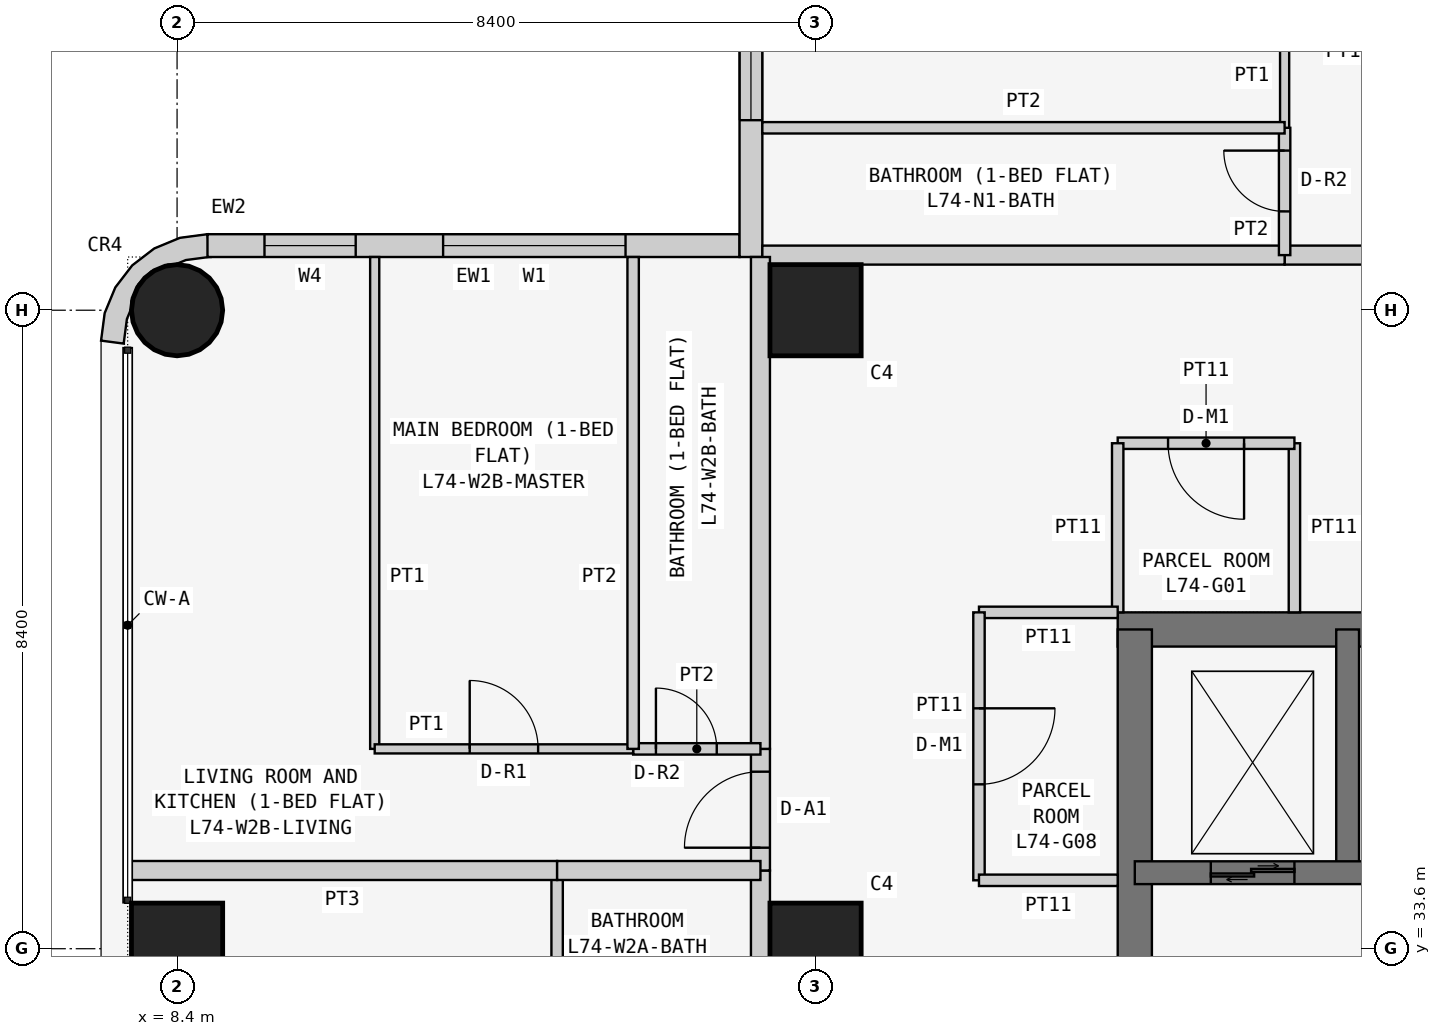
"""IFC4 building model, lengths in metres.
Left out: names, types, materials, properties, quantities, classifications, styles, units other than length and angle.
Written with IfcOpenShell. Run it as: python <this file> out.ifc"""

import sys

from ifc_helpers import new_model, si_unit, direction, frame, frame_2d, origin, origin_2d, place, context, subcontext, project, spatial, polyline, rectangle, circle, outline, extrude, element, fill, save


model = new_model("IFC4")
c1 = context("Model", 3, precision=1e-05, world=origin(), true_north=direction((0.0, 1.0)))
c2 = subcontext(c1, "Body", "Model", "MODEL_VIEW")
j1 = project(units=[si_unit("LENGTHUNIT", "METRE"), si_unit("PLANEANGLEUNIT", "RADIAN")], contexts=[c1])
p1 = place(None, origin())
s1 = spatial("IfcSite", under=j1, at=p1, CompositionType="ELEMENT")
p2 = place(p1, origin())
s2 = spatial("IfcBuilding", under=s1, at=p2, CompositionType="ELEMENT")
p3 = place(p2, frame((0.0, 0.0, 282.9)))
s3 = spatial("IfcBuildingStorey", under=s2, at=p3, CompositionType="ELEMENT", Elevation=282.9)
p4 = place(p3, frame((8.4, 33.6, 0.0), z_axis=(0.0, 0.0, 1.0), x_axis=(1.0, 0.0, 0.0)))
e1 = element("IfcColumn", 1, at=p4, inside=s3, PredefinedType="COLUMN", context=c2, shape_type="SweptSolid", body=[
    extrude(rectangle(XDim=1.2, YDim=1.2, at=origin_2d()), origin(), (0.0, 0.0, 1.0), 3.6),
])
p5 = place(p3, frame((8.4, 42.0, 0.0), z_axis=(0.0, 0.0, 1.0), x_axis=(1.0, 0.0, 0.0)))
e2 = element("IfcColumn", 2, at=p5, inside=s3, PredefinedType="COLUMN", context=c2, shape_type="SweptSolid", body=[
    extrude(circle(Radius=0.6, at=origin_2d()), origin(), (0.0, 0.0, 1.0), 3.6),
])
for number, where, z_axis, x_axis in (
    (3, (16.8, 33.6, 0.0), (0.0, 0.0, 1.0), (1.0, 0.0, 0.0)),
    (4, (16.8, 42.0, 0.0), (0.0, 0.0, 1.0), (1.0, 0.0, 0.0)),
):
    element("IfcColumn", number, at=place(p3, frame(where, z_axis=z_axis, x_axis=x_axis)), inside=s3, PredefinedType="COLUMN", context=c2, shape_type="SweptSolid", body=[
        extrude(rectangle(XDim=1.2, YDim=1.2, at=origin_2d()), origin(), (0.0, 0.0, 1.0), 3.6),
    ])
p6 = place(p3, frame((37.8, 37.8, 0.0), z_axis=(0.0, 0.0, 1.0), x_axis=(-1.0, 0.0, 0.0)))
e5 = element("IfcWall", 5, at=p6, inside=s3, PredefinedType="SHEAR", context=c2, shape_type="SweptSolid", body=[
    extrude(rectangle(XDim=17.025, YDim=0.45, at=frame_2d((8.513, 0.0))), origin(), (0.0, 0.0, 1.0), 3.6),
])
p7 = place(p3, frame((21.0, 37.8, 0.0), z_axis=(0.0, 0.0, 1.0), x_axis=(0.0, -1.0, 0.0)))
e6 = element("IfcWall", 6, at=p7, inside=s3, PredefinedType="SHEAR", context=c2, shape_type="SweptSolid", body=[
    extrude(rectangle(XDim=17.025, YDim=0.45, at=frame_2d((8.513, 0.0))), origin(), (0.0, 0.0, 1.0), 3.6),
])
p8 = place(p7, frame((5.4, 0.0, 0.0)))
e7 = element("IfcOpeningElement", 7, at=p8, cuts=e6, PredefinedType="OPENING", context=c2, shape_type="SweptSolid", body=[
    extrude(rectangle(XDim=1.2, YDim=2.1, at=frame_2d((0.6, 1.05))), frame((0.0, 0.235, 0.0), z_axis=(0.0, -1.0, 0.0), x_axis=(1.0, 0.0, 0.0)), (0.0, 0.0, 1.0), 0.47),
])
p9 = place(p3, frame((21.0, 34.6, 0.0), z_axis=(0.0, 0.0, 1.0), x_axis=(1.0, 0.0, 0.0)))
e8 = element("IfcWall", 8, at=p9, inside=s3, PredefinedType="SHEAR", context=c2, shape_type="SweptSolid", body=[
    extrude(rectangle(XDim=11.2, YDim=0.3, at=frame_2d((5.6, 0.0))), origin(), (0.0, 0.0, 1.0), 3.6),
])
p10 = place(p9, frame((9.35, 0.0, 0.0)))
e9 = element("IfcOpeningElement", 9, at=p10, cuts=e8, PredefinedType="OPENING", context=c2, shape_type="SweptSolid", body=[
    extrude(rectangle(XDim=0.9, YDim=2.1, at=frame_2d((0.45, 1.05))), frame((0.0, 0.16, 0.0), z_axis=(0.0, -1.0, 0.0), x_axis=(1.0, 0.0, 0.0)), (0.0, 0.0, 1.0), 0.32),
])
p11 = place(p9, frame((1.0, 0.0, 0.0)))
e10 = element("IfcOpeningElement", 10, at=p11, cuts=e8, PredefinedType="OPENING", context=c2, shape_type="SweptSolid", body=[
    extrude(rectangle(XDim=1.1, YDim=2.1, at=frame_2d((0.55, 1.05))), frame((0.0, 0.16, 0.0), z_axis=(0.0, -1.0, 0.0), x_axis=(1.0, 0.0, 0.0)), (0.0, 0.0, 1.0), 0.32),
])
p12 = place(p9, frame((3.65, 0.0, 0.0)))
e11 = element("IfcOpeningElement", 11, at=p12, cuts=e8, PredefinedType="OPENING", context=c2, shape_type="SweptSolid", body=[
    extrude(rectangle(XDim=1.1, YDim=2.1, at=frame_2d((0.55, 1.05))), frame((0.0, 0.16, 0.0), z_axis=(0.0, -1.0, 0.0), x_axis=(1.0, 0.0, 0.0)), (0.0, 0.0, 1.0), 0.32),
])
p13 = place(p9, frame((6.35, 0.0, 0.0)))
e12 = element("IfcOpeningElement", 12, at=p13, cuts=e8, PredefinedType="OPENING", context=c2, shape_type="SweptSolid", body=[
    extrude(rectangle(XDim=1.3, YDim=2.1, at=frame_2d((0.65, 1.05))), frame((0.0, 0.16, 0.0), z_axis=(0.0, -1.0, 0.0), x_axis=(1.0, 0.0, 0.0)), (0.0, 0.0, 1.0), 0.32),
])
p14 = place(p3, frame((23.8, 34.6, 0.0), z_axis=(0.0, 0.0, 1.0), x_axis=(0.0, 1.0, 0.0)))
e13 = element("IfcWall", 13, at=p14, inside=s3, PredefinedType="SHEAR", context=c2, shape_type="SweptSolid", body=[
    extrude(rectangle(XDim=3.2, YDim=0.3, at=frame_2d((1.6, 0.0))), origin(), (0.0, 0.0, 1.0), 3.6),
])
p15 = place(p3, frame((15.8, 42.85, 0.0), z_axis=(0.0, 0.0, 1.0), x_axis=(-1.0, 0.0, 0.0)))
e14 = element("IfcWall", 14, at=p15, inside=s3, PredefinedType="SOLIDWALL", context=c2, shape_type="SweptSolid", body=[
    extrude(rectangle(XDim=7.0, YDim=0.3, at=frame_2d((3.5, 0.0))), origin(), (0.0, 0.0, 1.0), 3.45),
])
p16 = place(p15, frame((1.5, 0.0, 0.9)))
e15 = element("IfcOpeningElement", 15, at=p16, cuts=e14, PredefinedType="OPENING", context=c2, shape_type="SweptSolid", body=[
    extrude(rectangle(XDim=2.4, YDim=1.5, at=frame_2d((1.2, 0.75))), frame((0.0, 0.16, 0.0), z_axis=(0.0, -1.0, 0.0), x_axis=(1.0, 0.0, 0.0)), (0.0, 0.0, 1.0), 0.32),
])
p17 = place(p15, frame((5.05, 0.0, 0.9)))
e16 = element("IfcOpeningElement", 16, at=p17, cuts=e14, PredefinedType="OPENING", context=c2, shape_type="SweptSolid", body=[
    extrude(rectangle(XDim=1.2, YDim=1.5, at=frame_2d((0.6, 0.75))), frame((0.0, 0.16, 0.0), z_axis=(0.0, -1.0, 0.0), x_axis=(1.0, 0.0, 0.0)), (0.0, 0.0, 1.0), 0.32),
])
p18 = place(p3, frame((15.95, 50.0, 0.0), z_axis=(0.0, 0.0, 1.0), x_axis=(0.0, -1.0, 0.0)))
e17 = element("IfcWall", 17, at=p18, inside=s3, PredefinedType="SOLIDWALL", context=c2, shape_type="SweptSolid", body=[
    extrude(rectangle(XDim=7.3, YDim=0.3, at=frame_2d((3.65, 0.0))), origin(), (0.0, 0.0, 1.0), 3.45),
])
p19 = place(p18, frame((3.1, 0.0, 0.9)))
e18 = element("IfcOpeningElement", 18, at=p19, cuts=e17, PredefinedType="OPENING", context=c2, shape_type="SweptSolid", body=[
    extrude(rectangle(XDim=2.4, YDim=1.5, at=frame_2d((1.2, 0.75))), frame((0.0, 0.16, 0.0), z_axis=(0.0, -1.0, 0.0), x_axis=(1.0, 0.0, 0.0)), (0.0, 0.0, 1.0), 0.32),
])
p20 = place(p18, frame((0.75, 0.0, 0.9)))
e19 = element("IfcOpeningElement", 19, at=p20, cuts=e17, PredefinedType="OPENING", context=c2, shape_type="SweptSolid", body=[
    extrude(rectangle(XDim=1.2, YDim=1.5, at=frame_2d((0.6, 0.75))), frame((0.0, 0.16, 0.0), z_axis=(0.0, -1.0, 0.0), x_axis=(1.0, 0.0, 0.0)), (0.0, 0.0, 1.0), 0.32),
])
p21 = place(p3, frame((8.762, 42.576, 0.0), z_axis=(0.0, 0.0, 1.0), x_axis=(-0.707106781187, 0.707106781187, 0.0)))
e20 = element("IfcWall", 20, at=p21, inside=s3, PredefinedType="SOLIDWALL", context=c2, shape_type="SweptSolid", body=[
    extrude(outline(polyline([(0.233, 0.114), (0.047, -0.129), (0.033, -0.143), (0.273, -0.327), (0.495, -0.037), (0.635, 0.3), (0.683, 0.663), (0.635, 1.025), (0.495, 1.363), (0.273, 1.653), (0.033, 1.469), (0.047, 1.455), (0.233, 1.212), (0.292, 1.069), (0.358, 1.003), (0.449, 0.783), (0.449, 0.543), (0.358, 0.322), (0.292, 0.257), (0.233, 0.114)])), origin(), (0.0, 0.0, 1.0), 3.45),
])
p22 = place(p3, frame((23.1, 38.025, 0.0), z_axis=(0.0, 0.0, 1.0), x_axis=(0.0, 1.0, 0.0)))
e21 = element("IfcWall", 21, at=p22, inside=s3, PredefinedType="PARTITIONING", context=c2, shape_type="SweptSolid", body=[
    extrude(rectangle(XDim=2.225, YDim=0.15, at=frame_2d((1.113, 0.0))), origin(), (0.0, 0.0, 1.0), 3.45),
])
p23 = place(p3, frame((23.1, 40.25, 0.0), z_axis=(0.0, 0.0, 1.0), x_axis=(-1.0, 0.0, 0.0)))
e22 = element("IfcWall", 22, at=p23, inside=s3, PredefinedType="PARTITIONING", context=c2, shape_type="SweptSolid", body=[
    extrude(rectangle(XDim=2.325, YDim=0.15, at=frame_2d((1.163, 0.0))), origin(), (0.0, 0.0, 1.0), 3.45),
])
p24 = place(p23, frame((0.663, 0.0, 0.0)))
e23 = element("IfcOpeningElement", 23, at=p24, cuts=e22, PredefinedType="OPENING", context=c2, shape_type="SweptSolid", body=[
    extrude(rectangle(XDim=1.0, YDim=2.1, at=frame_2d((0.5, 1.05))), frame((0.0, 0.085, 0.0), z_axis=(0.0, -1.0, 0.0), x_axis=(1.0, 0.0, 0.0)), (0.0, 0.0, 1.0), 0.17),
])
p25 = place(p3, frame((20.775, 40.25, 0.0), z_axis=(0.0, 0.0, 1.0), x_axis=(0.0, -1.0, 0.0)))
e24 = element("IfcWall", 24, at=p25, inside=s3, PredefinedType="PARTITIONING", context=c2, shape_type="SweptSolid", body=[
    extrude(rectangle(XDim=2.225, YDim=0.15, at=frame_2d((1.113, 0.0))), origin(), (0.0, 0.0, 1.0), 3.45),
])
p26 = place(p3, frame((20.775, 38.025, 0.0), z_axis=(0.0, 0.0, 1.0), x_axis=(-1.0, 0.0, 0.0)))
e25 = element("IfcWall", 25, at=p26, inside=s3, PredefinedType="PARTITIONING", context=c2, shape_type="SweptSolid", body=[
    extrude(rectangle(XDim=1.825, YDim=0.15, at=frame_2d((0.913, 0.0))), origin(), (0.0, 0.0, 1.0), 3.45),
])
p27 = place(p3, frame((18.95, 38.025, 0.0), z_axis=(0.0, 0.0, 1.0), x_axis=(0.0, -1.0, 0.0)))
e26 = element("IfcWall", 26, at=p27, inside=s3, PredefinedType="PARTITIONING", context=c2, shape_type="SweptSolid", body=[
    extrude(rectangle(XDim=3.525, YDim=0.15, at=frame_2d((1.762, 0.0))), origin(), (0.0, 0.0, 1.0), 3.45),
])
p28 = place(p27, frame((1.262, 0.0, 0.0)))
e27 = element("IfcOpeningElement", 27, at=p28, cuts=e26, PredefinedType="OPENING", context=c2, shape_type="SweptSolid", body=[
    extrude(rectangle(XDim=1.0, YDim=2.1, at=frame_2d((0.5, 1.05))), frame((0.0, 0.085, 0.0), z_axis=(0.0, -1.0, 0.0), x_axis=(1.0, 0.0, 0.0)), (0.0, 0.0, 1.0), 0.17),
])
p29 = place(p3, frame((18.95, 34.5, 0.0), z_axis=(0.0, 0.0, 1.0), x_axis=(1.0, 0.0, 0.0)))
e28 = element("IfcWall", 28, at=p29, inside=s3, PredefinedType="PARTITIONING", context=c2, shape_type="SweptSolid", body=[
    extrude(rectangle(XDim=1.825, YDim=0.15, at=frame_2d((0.913, 0.0))), origin(), (0.0, 0.0, 1.0), 3.45),
])
p30 = place(p3, frame((22.971, 42.725, 0.0), z_axis=(0.0, 0.0, 1.0), x_axis=(1.0, 0.0, 0.0)))
e29 = element("IfcWall", 29, at=p30, inside=s3, PredefinedType="PARTITIONING", context=c2, shape_type="SweptSolid", body=[
    extrude(rectangle(XDim=6.429, YDim=0.25, at=frame_2d((3.214, 0.0))), origin(), (0.0, 0.0, 1.0), 3.45),
])
p31 = place(p30, frame((4.929, 0.0, 0.0)))
e30 = element("IfcOpeningElement", 30, at=p31, cuts=e29, PredefinedType="OPENING", context=c2, shape_type="SweptSolid", body=[
    extrude(rectangle(XDim=1.0, YDim=2.1, at=frame_2d((0.5, 1.05))), frame((0.0, 0.135, 0.0), z_axis=(0.0, -1.0, 0.0), x_axis=(1.0, 0.0, 0.0)), (0.0, 0.0, 1.0), 0.27),
])
p32 = place(p3, frame((16.1, 42.725, 0.0), z_axis=(0.0, 0.0, 1.0), x_axis=(1.0, 0.0, 0.0)))
e31 = element("IfcWall", 31, at=p32, inside=s3, PredefinedType="PARTITIONING", context=c2, shape_type="SweptSolid", body=[
    extrude(rectangle(XDim=6.871, YDim=0.25, at=frame_2d((3.436, 0.0))), origin(), (0.0, 0.0, 1.0), 3.45),
])
p33 = place(p3, frame((16.075, 32.0, 0.0), z_axis=(0.0, 0.0, 1.0), x_axis=(0.0, 1.0, 0.0)))
e32 = element("IfcWall", 32, at=p33, inside=s3, PredefinedType="PARTITIONING", context=c2, shape_type="SweptSolid", body=[
    extrude(rectangle(XDim=2.629, YDim=0.25, at=frame_2d((1.314, 0.0))), origin(), (0.0, 0.0, 1.0), 3.45),
])
p34 = place(p3, frame((16.075, 34.629, 0.0), z_axis=(0.0, 0.0, 1.0), x_axis=(0.0, 1.0, 0.0)))
e33 = element("IfcWall", 33, at=p34, inside=s3, PredefinedType="PARTITIONING", context=c2, shape_type="SweptSolid", body=[
    extrude(rectangle(XDim=1.6, YDim=0.25, at=frame_2d((0.8, 0.0))), origin(), (0.0, 0.0, 1.0), 3.45),
])
p35 = place(p34, frame((0.3, 0.0, 0.0)))
e34 = element("IfcOpeningElement", 34, at=p35, cuts=e33, PredefinedType="OPENING", context=c2, shape_type="SweptSolid", body=[
    extrude(rectangle(XDim=1.0, YDim=2.1, at=frame_2d((0.5, 1.05))), frame((0.0, 0.135, 0.0), z_axis=(0.0, -1.0, 0.0), x_axis=(1.0, 0.0, 0.0)), (0.0, 0.0, 1.0), 0.27),
])
p36 = place(p3, frame((16.075, 36.229, 0.0), z_axis=(0.0, 0.0, 1.0), x_axis=(0.0, 1.0, 0.0)))
e35 = element("IfcWall", 35, at=p36, inside=s3, PredefinedType="PARTITIONING", context=c2, shape_type="SweptSolid", body=[
    extrude(rectangle(XDim=6.471, YDim=0.25, at=frame_2d((3.235, 0.0))), origin(), (0.0, 0.0, 1.0), 3.45),
])
p37 = place(p3, frame((22.971, 42.725, 0.0), z_axis=(0.0, 0.0, 1.0), x_axis=(0.0, 1.0, 0.0)))
e36 = element("IfcWall", 36, at=p37, inside=s3, PredefinedType="PARTITIONING", context=c2, shape_type="SweptSolid", body=[
    extrude(rectangle(XDim=1.675, YDim=0.15, at=frame_2d((0.837, 0.0))), origin(), (0.0, 0.0, 1.0), 3.45),
])
p38 = place(p37, frame((0.575, 0.0, 0.0)))
e37 = element("IfcOpeningElement", 37, at=p38, cuts=e36, PredefinedType="OPENING", context=c2, shape_type="SweptSolid", body=[
    extrude(rectangle(XDim=0.8, YDim=2.1, at=frame_2d((0.4, 1.05))), frame((0.0, 0.085, 0.0), z_axis=(0.0, -1.0, 0.0), x_axis=(1.0, 0.0, 0.0)), (0.0, 0.0, 1.0), 0.17),
])
p39 = place(p3, frame((22.971, 44.4, 0.0), z_axis=(0.0, 0.0, 1.0), x_axis=(0.0, 1.0, 0.0)))
e38 = element("IfcWall", 38, at=p39, inside=s3, PredefinedType="PARTITIONING", context=c2, shape_type="SweptSolid", body=[
    extrude(rectangle(XDim=3.4, YDim=0.12, at=frame_2d((1.7, 0.0))), origin(), (0.0, 0.0, 1.0), 3.45),
])
p40 = place(p39, frame((1.25, 0.0, 0.0)))
e39 = element("IfcOpeningElement", 39, at=p40, cuts=e38, PredefinedType="OPENING", context=c2, shape_type="SweptSolid", body=[
    extrude(rectangle(XDim=0.9, YDim=2.1, at=frame_2d((0.45, 1.05))), frame((0.0, 0.07, 0.0), z_axis=(0.0, -1.0, 0.0), x_axis=(1.0, 0.0, 0.0)), (0.0, 0.0, 1.0), 0.14),
])
p41 = place(p3, frame((22.971, 44.4, 0.0), z_axis=(0.0, 0.0, 1.0), x_axis=(-1.0, 0.0, 0.0)))
e40 = element("IfcWall", 40, at=p41, inside=s3, PredefinedType="PARTITIONING", context=c2, shape_type="SweptSolid", body=[
    extrude(rectangle(XDim=6.871, YDim=0.15, at=frame_2d((3.436, 0.0))), origin(), (0.0, 0.0, 1.0), 3.45),
])
p42 = place(p3, frame((13.4, 34.629, 0.0), z_axis=(0.0, 0.0, 1.0), x_axis=(0.0, -1.0, 0.0)))
e41 = element("IfcWall", 41, at=p42, inside=s3, PredefinedType="PARTITIONING", context=c2, shape_type="SweptSolid", body=[
    extrude(rectangle(XDim=2.629, YDim=0.15, at=frame_2d((1.314, 0.0))), origin(), (0.0, 0.0, 1.0), 3.45),
])
p43 = place(p3, frame((7.75, 34.629, 0.0), z_axis=(0.0, 0.0, 1.0), x_axis=(1.0, 0.0, 0.0)))
e42 = element("IfcWall", 42, at=p43, inside=s3, PredefinedType="PARTITIONING", context=c2, shape_type="SweptSolid", body=[
    extrude(rectangle(XDim=5.65, YDim=0.25, at=frame_2d((2.825, 0.0))), origin(), (0.0, 0.0, 1.0), 3.45),
])
p44 = place(p3, frame((13.4, 34.629, 0.0), z_axis=(0.0, 0.0, 1.0), x_axis=(1.0, 0.0, 0.0)))
e43 = element("IfcWall", 43, at=p44, inside=s3, PredefinedType="PARTITIONING", context=c2, shape_type="SweptSolid", body=[
    extrude(rectangle(XDim=2.675, YDim=0.25, at=frame_2d((1.337, 0.0))), origin(), (0.0, 0.0, 1.0), 3.45),
])
p45 = place(p3, frame((14.4, 36.229, 0.0), z_axis=(0.0, 0.0, 1.0), x_axis=(1.0, 0.0, 0.0)))
e44 = element("IfcWall", 44, at=p45, inside=s3, PredefinedType="PARTITIONING", context=c2, shape_type="SweptSolid", body=[
    extrude(rectangle(XDim=1.675, YDim=0.15, at=frame_2d((0.837, 0.0))), origin(), (0.0, 0.0, 1.0), 3.45),
])
p46 = place(p45, frame((0.3, 0.0, 0.0)))
e45 = element("IfcOpeningElement", 45, at=p46, cuts=e44, PredefinedType="OPENING", context=c2, shape_type="SweptSolid", body=[
    extrude(rectangle(XDim=0.8, YDim=2.1, at=frame_2d((0.4, 1.05))), frame((0.0, 0.085, 0.0), z_axis=(0.0, -1.0, 0.0), x_axis=(1.0, 0.0, 0.0)), (0.0, 0.0, 1.0), 0.17),
])
p47 = place(p3, frame((11.0, 42.7, 0.0), z_axis=(0.0, 0.0, 1.0), x_axis=(0.0, -1.0, 0.0)))
e46 = element("IfcWall", 46, at=p47, inside=s3, PredefinedType="PARTITIONING", context=c2, shape_type="SweptSolid", body=[
    extrude(rectangle(XDim=6.471, YDim=0.12, at=frame_2d((3.235, 0.0))), origin(), (0.0, 0.0, 1.0), 3.45),
])
p48 = place(p3, frame((11.0, 36.229, 0.0), z_axis=(0.0, 0.0, 1.0), x_axis=(1.0, 0.0, 0.0)))
e47 = element("IfcWall", 47, at=p48, inside=s3, PredefinedType="PARTITIONING", context=c2, shape_type="SweptSolid", body=[
    extrude(rectangle(XDim=3.4, YDim=0.12, at=frame_2d((1.7, 0.0))), origin(), (0.0, 0.0, 1.0), 3.45),
])
p49 = place(p48, frame((1.25, 0.0, 0.0)))
e48 = element("IfcOpeningElement", 48, at=p49, cuts=e47, PredefinedType="OPENING", context=c2, shape_type="SweptSolid", body=[
    extrude(rectangle(XDim=0.9, YDim=2.1, at=frame_2d((0.45, 1.05))), frame((0.0, 0.07, 0.0), z_axis=(0.0, -1.0, 0.0), x_axis=(1.0, 0.0, 0.0)), (0.0, 0.0, 1.0), 0.14),
])
p50 = place(p3, frame((14.4, 36.229, 0.0), z_axis=(0.0, 0.0, 1.0), x_axis=(0.0, 1.0, 0.0)))
e49 = element("IfcWall", 49, at=p50, inside=s3, PredefinedType="PARTITIONING", context=c2, shape_type="SweptSolid", body=[
    extrude(rectangle(XDim=6.471, YDim=0.15, at=frame_2d((3.235, 0.0))), origin(), (0.0, 0.0, 1.0), 3.45),
])
p51 = place(p19, origin())
e50 = element("IfcWindow", 50, at=p51, inside=s3, PartitioningType="SINGLE_PANEL", PredefinedType="WINDOW", context=c2, shape_type="SweptSolid", body=[
    extrude(rectangle(XDim=2.4, YDim=1.5, at=frame_2d((1.2, 0.75))), frame((0.0, 0.03, 0.0), z_axis=(0.0, -1.0, 0.0), x_axis=(1.0, 0.0, 0.0)), (0.0, 0.0, 1.0), 0.06),
])
fill(e18, e50)
p52 = place(p16, origin())
e51 = element("IfcWindow", 51, at=p52, inside=s3, PartitioningType="SINGLE_PANEL", PredefinedType="WINDOW", context=c2, shape_type="SweptSolid", body=[
    extrude(rectangle(XDim=2.4, YDim=1.5, at=frame_2d((1.2, 0.75))), frame((0.0, 0.03, 0.0), z_axis=(0.0, -1.0, 0.0), x_axis=(1.0, 0.0, 0.0)), (0.0, 0.0, 1.0), 0.06),
])
fill(e15, e51)
p53 = place(p17, origin())
e52 = element("IfcWindow", 52, at=p53, inside=s3, PartitioningType="SINGLE_PANEL", PredefinedType="WINDOW", context=c2, shape_type="SweptSolid", body=[
    extrude(rectangle(XDim=1.2, YDim=1.5, at=frame_2d((0.6, 0.75))), frame((0.0, 0.03, 0.0), z_axis=(0.0, -1.0, 0.0), x_axis=(1.0, 0.0, 0.0)), (0.0, 0.0, 1.0), 0.06),
])
fill(e16, e52)
p54 = place(p24, origin())
e53 = element("IfcDoor", 53, at=p54, inside=s3, OperationType="SINGLE_SWING_LEFT", PredefinedType="DOOR", context=c2, shape_type="SweptSolid", body=[
    extrude(rectangle(XDim=1.0, YDim=2.1, at=frame_2d((0.5, 1.05))), frame((0.0, 0.025, 0.0), z_axis=(0.0, -1.0, 0.0), x_axis=(1.0, 0.0, 0.0)), (0.0, 0.0, 1.0), 0.05),
])
fill(e23, e53)
p55 = place(p28, origin())
e54 = element("IfcDoor", 54, at=p55, inside=s3, OperationType="SINGLE_SWING_LEFT", PredefinedType="DOOR", context=c2, shape_type="SweptSolid", body=[
    extrude(rectangle(XDim=1.0, YDim=2.1, at=frame_2d((0.5, 1.05))), frame((0.0, 0.025, 0.0), z_axis=(0.0, -1.0, 0.0), x_axis=(1.0, 0.0, 0.0)), (0.0, 0.0, 1.0), 0.05),
])
fill(e27, e54)
p56 = place(p38, origin())
e55 = element("IfcDoor", 55, at=p56, inside=s3, OperationType="SINGLE_SWING_RIGHT", PredefinedType="DOOR", context=c2, shape_type="SweptSolid", body=[
    extrude(rectangle(XDim=0.8, YDim=2.1, at=frame_2d((0.4, 1.05))), frame((0.0, 0.025, 0.0), z_axis=(0.0, -1.0, 0.0), x_axis=(1.0, 0.0, 0.0)), (0.0, 0.0, 1.0), 0.05),
])
fill(e37, e55)
p57 = place(p35, origin())
e56 = element("IfcDoor", 56, at=p57, inside=s3, OperationType="SINGLE_SWING_LEFT", PredefinedType="DOOR", context=c2, shape_type="SweptSolid", body=[
    extrude(rectangle(XDim=1.0, YDim=2.1, at=frame_2d((0.5, 1.05))), frame((0.0, 0.025, 0.0), z_axis=(0.0, -1.0, 0.0), x_axis=(1.0, 0.0, 0.0)), (0.0, 0.0, 1.0), 0.05),
])
fill(e34, e56)
p58 = place(p46, origin())
e57 = element("IfcDoor", 57, at=p58, inside=s3, OperationType="SINGLE_SWING_LEFT", PredefinedType="DOOR", context=c2, shape_type="SweptSolid", body=[
    extrude(rectangle(XDim=0.8, YDim=2.1, at=frame_2d((0.4, 1.05))), frame((0.0, 0.025, 0.0), z_axis=(0.0, -1.0, 0.0), x_axis=(1.0, 0.0, 0.0)), (0.0, 0.0, 1.0), 0.05),
])
fill(e45, e57)
p59 = place(p49, origin())
e58 = element("IfcDoor", 58, at=p59, inside=s3, OperationType="SINGLE_SWING_LEFT", PredefinedType="DOOR", context=c2, shape_type="SweptSolid", body=[
    extrude(rectangle(XDim=0.9, YDim=2.1, at=frame_2d((0.45, 1.05))), frame((0.0, 0.025, 0.0), z_axis=(0.0, -1.0, 0.0), x_axis=(1.0, 0.0, 0.0)), (0.0, 0.0, 1.0), 0.05),
])
fill(e48, e58)
p60 = place(p11, origin())
e59 = element("IfcDoor", 59, at=p60, inside=s3, OperationType="DOUBLE_DOOR_SLIDING", PredefinedType="DOOR", context=c2, shape_type="SweptSolid", body=[
    extrude(rectangle(XDim=1.1, YDim=2.1, at=frame_2d((0.55, 1.05))), frame((0.0, 0.025, 0.0), z_axis=(0.0, -1.0, 0.0), x_axis=(1.0, 0.0, 0.0)), (0.0, 0.0, 1.0), 0.05),
])
fill(e10, e59)
save(model, sys.argv[1])
